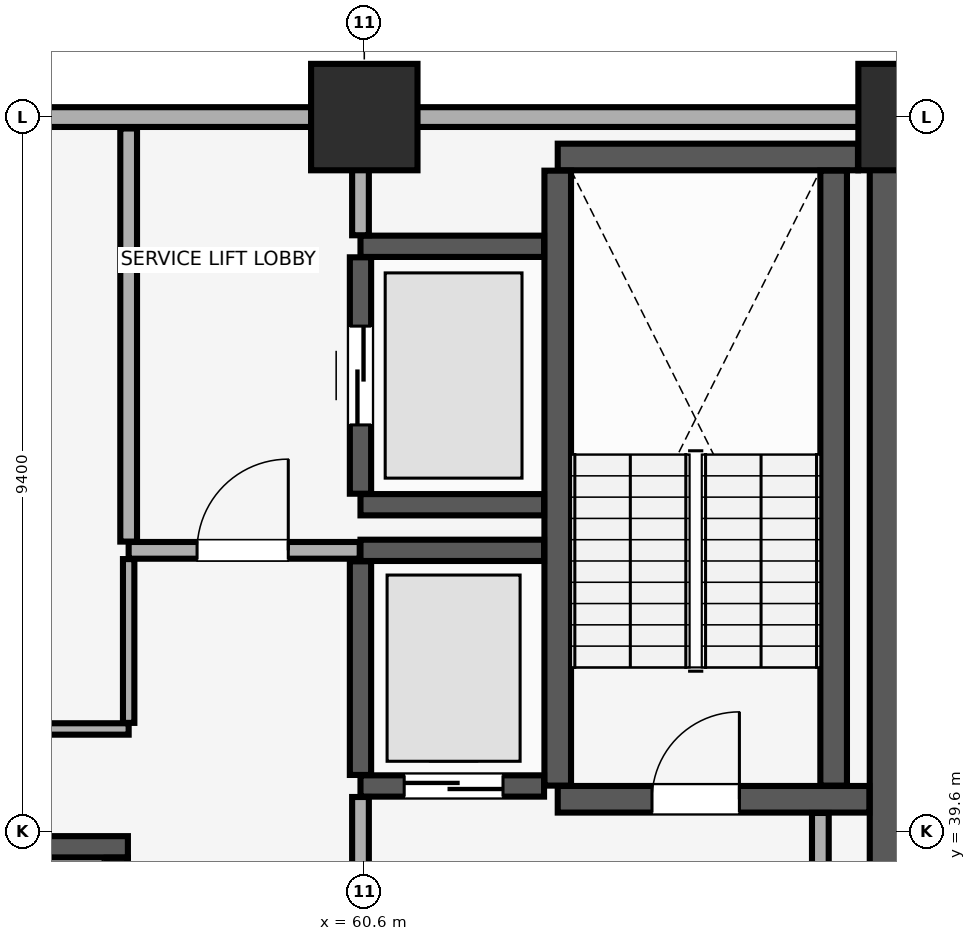
"""IFC4 building model, lengths in metres.
Left out: names, types, materials, properties, quantities, classifications, styles, units other than length and angle.
Written with IfcOpenShell. Run it as: python <this file> out.ifc"""

import sys

from ifc_helpers import new_model, si_unit, direction, frame, frame_2d, origin, origin_2d, place, context, subcontext, project, spatial, rectangle, extrude, element, fill, save


model = new_model("IFC4")
c1 = context("Model", 3, precision=1e-05, world=origin(), true_north=direction((0.0, 1.0)))
c2 = subcontext(c1, "Body", "Model", "MODEL_VIEW")
j1 = project(units=[si_unit("LENGTHUNIT", "METRE"), si_unit("PLANEANGLEUNIT", "RADIAN")], contexts=[c1])
p1 = place(None, origin())
s1 = spatial("IfcSite", under=j1, at=p1, CompositionType="ELEMENT")
p2 = place(p1, origin())
s2 = spatial("IfcBuilding", under=s1, at=p2, CompositionType="ELEMENT")
p3 = place(p2, frame((0.0, 0.0, 68.9)))
s3 = spatial("IfcBuildingStorey", under=s2, at=p3, CompositionType="ELEMENT", Elevation=68.9)
for number, where, z_axis, x_axis in (
    (1, (60.6, 49.0, 0.0), (0.0, 0.0, 1.0), (1.0, 0.0, 0.0)),
    (2, (67.8, 49.0, 0.0), (0.0, 0.0, 1.0), (1.0, 0.0, 0.0)),
):
    element("IfcColumn", number, at=place(p3, frame(where, z_axis=z_axis, x_axis=x_axis)), inside=s3, PredefinedType="COLUMN", context=c2, shape_type="SweptSolid", body=[
        extrude(rectangle(XDim=1.4, YDim=1.4, at=origin_2d()), origin(), (0.0, 0.0, 1.0), 3.51),
    ])
p4 = place(p3, frame((79.8, 49.0, 0.0), z_axis=(0.0, 0.0, 1.0), x_axis=(-1.0, 0.0, 0.0)))
e3 = element("IfcWall", 3, at=p4, inside=s3, PredefinedType="SOLIDWALL", context=c2, shape_type="SweptSolid", body=[
    extrude(rectangle(XDim=75.6, YDim=0.26, at=frame_2d((37.8, 0.0))), origin(), (0.0, 0.0, 1.0), 2.56),
])
p5 = place(p4, frame((72.565, 0.0, 0.85)))
e4 = element("IfcOpeningElement", 4, at=p5, cuts=e3, PredefinedType="OPENING", context=c2, shape_type="SweptSolid", body=[
    extrude(rectangle(XDim=1.5, YDim=1.4, at=frame_2d((0.75, 0.7))), frame((0.0, 0.14, 0.0), z_axis=(0.0, -1.0, 0.0), x_axis=(1.0, 0.0, 0.0)), (0.0, 0.0, 1.0), 0.28),
])
p6 = place(p4, frame((67.45, 0.0, 0.85)))
e5 = element("IfcOpeningElement", 5, at=p6, cuts=e3, PredefinedType="OPENING", context=c2, shape_type="SweptSolid", body=[
    extrude(rectangle(XDim=1.5, YDim=1.4, at=frame_2d((0.75, 0.7))), frame((0.0, 0.14, 0.0), z_axis=(0.0, -1.0, 0.0), x_axis=(1.0, 0.0, 0.0)), (0.0, 0.0, 1.0), 0.28),
])
p7 = place(p4, frame((6.65, 0.0, 0.85)))
e6 = element("IfcOpeningElement", 6, at=p7, cuts=e3, PredefinedType="OPENING", context=c2, shape_type="SweptSolid", body=[
    extrude(rectangle(XDim=1.5, YDim=1.4, at=frame_2d((0.75, 0.7))), frame((0.0, 0.14, 0.0), z_axis=(0.0, -1.0, 0.0), x_axis=(1.0, 0.0, 0.0)), (0.0, 0.0, 1.0), 0.28),
])
p8 = place(p4, frame((1.535, 0.0, 0.85)))
e7 = element("IfcOpeningElement", 7, at=p8, cuts=e3, PredefinedType="OPENING", context=c2, shape_type="SweptSolid", body=[
    extrude(rectangle(XDim=1.5, YDim=1.4, at=frame_2d((0.75, 0.7))), frame((0.0, 0.14, 0.0), z_axis=(0.0, -1.0, 0.0), x_axis=(1.0, 0.0, 0.0)), (0.0, 0.0, 1.0), 0.28),
])
p9 = place(p4, frame((51.365, 0.0, 0.9)))
e8 = element("IfcOpeningElement", 8, at=p9, cuts=e3, PredefinedType="OPENING", context=c2, shape_type="SweptSolid", body=[
    extrude(rectangle(XDim=1.5, YDim=1.4, at=frame_2d((0.75, 0.7))), frame((0.0, 0.14, 0.0), z_axis=(0.0, -1.0, 0.0), x_axis=(1.0, 0.0, 0.0)), (0.0, 0.0, 1.0), 0.28),
])
p10 = place(p4, frame((46.0, 0.0, 0.9)))
e9 = element("IfcOpeningElement", 9, at=p10, cuts=e3, PredefinedType="OPENING", context=c2, shape_type="SweptSolid", body=[
    extrude(rectangle(XDim=1.5, YDim=1.4, at=frame_2d((0.75, 0.7))), frame((0.0, 0.14, 0.0), z_axis=(0.0, -1.0, 0.0), x_axis=(1.0, 0.0, 0.0)), (0.0, 0.0, 1.0), 0.28),
])
p11 = place(p4, frame((29.15, 0.0, 0.9)))
e10 = element("IfcOpeningElement", 10, at=p11, cuts=e3, PredefinedType="OPENING", context=c2, shape_type="SweptSolid", body=[
    extrude(rectangle(XDim=1.5, YDim=1.4, at=frame_2d((0.75, 0.7))), frame((0.0, 0.14, 0.0), z_axis=(0.0, -1.0, 0.0), x_axis=(1.0, 0.0, 0.0)), (0.0, 0.0, 1.0), 0.28),
])
p12 = place(p4, frame((23.485, 0.0, 0.9)))
e11 = element("IfcOpeningElement", 11, at=p12, cuts=e3, PredefinedType="OPENING", context=c2, shape_type="SweptSolid", body=[
    extrude(rectangle(XDim=1.5, YDim=1.4, at=frame_2d((0.75, 0.7))), frame((0.0, 0.14, 0.0), z_axis=(0.0, -1.0, 0.0), x_axis=(1.0, 0.0, 0.0)), (0.0, 0.0, 1.0), 0.28),
])
p13 = place(p3, frame((67.8, 29.4, 0.0), z_axis=(0.0, 0.0, 1.0), x_axis=(0.0, 1.0, 0.0)))
e12 = element("IfcWall", 12, at=p13, inside=s3, PredefinedType="SHEAR", context=c2, shape_type="SweptSolid", body=[
    extrude(rectangle(XDim=19.2, YDim=1.1, at=frame_2d((9.6, 0.0))), origin(), (0.0, 0.0, 1.0), 3.51),
])
p14 = place(p3, frame((63.145, 40.025, 0.0), z_axis=(0.0, 0.0, 1.0), x_axis=(1.0, 0.0, 0.0)))
e13 = element("IfcWall", 13, at=p14, inside=s3, PredefinedType="SHEAR", context=c2, shape_type="SweptSolid", body=[
    extrude(rectangle(XDim=4.1, YDim=0.35, at=frame_2d((2.05, 0.0))), origin(), (0.0, 0.0, 1.0), 3.51),
])
p15 = place(p14, frame((1.24, 0.0, 0.0)))
e14 = element("IfcOpeningElement", 14, at=p15, cuts=e13, PredefinedType="OPENING", context=c2, shape_type="SweptSolid", body=[
    extrude(rectangle(XDim=1.15, YDim=2.15, at=frame_2d((0.575, 1.075))), frame((0.0, 0.185, 0.0), z_axis=(0.0, -1.0, 0.0), x_axis=(1.0, 0.0, 0.0)), (0.0, 0.0, 1.0), 0.37),
])
p16 = place(p3, frame((63.145, 48.475, 0.0), z_axis=(0.0, 0.0, 1.0), x_axis=(1.0, 0.0, 0.0)))
e15 = element("IfcWall", 15, at=p16, inside=s3, PredefinedType="SHEAR", context=c2, shape_type="SweptSolid", body=[
    extrude(rectangle(XDim=3.95, YDim=0.35, at=frame_2d((1.975, 0.0))), origin(), (0.0, 0.0, 1.0), 3.51),
])
for number, where, z_axis, x_axis in (
    (16, (63.145, 40.205, 0.0), (0.0, 0.0, 1.0), (0.0, 1.0, 0.0)),
    (17, (66.775, 40.205, 0.0), (0.0, 0.0, 1.0), (0.0, 1.0, 0.0)),
):
    element("IfcWall", number, at=place(p3, frame(where, z_axis=z_axis, x_axis=x_axis)), inside=s3, PredefinedType="SHEAR", context=c2, shape_type="SweptSolid", body=[
        extrude(rectangle(XDim=8.09, YDim=0.35, at=frame_2d((4.045, 0.0))), origin(), (0.0, 0.0, 1.0), 3.51),
    ])
p17 = place(p3, frame((54.66, 39.4, 0.0), z_axis=(0.0, 0.0, 1.0), x_axis=(1.0, 0.0, 0.0)))
e18 = element("IfcWall", 18, at=p17, inside=s3, PredefinedType="SHEAR", context=c2, shape_type="SweptSolid", body=[
    extrude(rectangle(XDim=2.83, YDim=0.28, at=frame_2d((1.415, 0.0))), origin(), (0.0, 0.0, 1.0), 3.51),
])
p18 = place(p3, frame((57.35, 37.145, 0.0), z_axis=(0.0, 0.0, 1.0), x_axis=(0.0, 1.0, 0.0)))
e19 = element("IfcWall", 19, at=p18, inside=s3, PredefinedType="SHEAR", context=c2, shape_type="SweptSolid", body=[
    extrude(rectangle(XDim=2.11, YDim=0.28, at=frame_2d((1.055, 0.0))), origin(), (0.0, 0.0, 1.0), 3.51),
])
p19 = place(p3, frame((60.55, 40.2, 0.0), z_axis=(0.0, 0.0, 1.0), x_axis=(1.0, 0.0, 0.0)))
e20 = element("IfcWall", 20, at=p19, inside=s3, PredefinedType="SHEAR", context=c2, shape_type="SweptSolid", body=[
    extrude(rectangle(XDim=2.415, YDim=0.28, at=frame_2d((1.208, 0.0))), origin(), (0.0, 0.0, 1.0), 3.51),
])
p20 = place(p19, frame((0.575, 0.0, 0.0)))
e21 = element("IfcOpeningElement", 21, at=p20, cuts=e20, PredefinedType="OPENING", context=c2, shape_type="SweptSolid", body=[
    extrude(rectangle(XDim=1.3, YDim=2.3, at=frame_2d((0.65, 1.15))), frame((0.0, 0.15, 0.0), z_axis=(0.0, -1.0, 0.0), x_axis=(1.0, 0.0, 0.0)), (0.0, 0.0, 1.0), 0.3),
])
p21 = place(p3, frame((60.55, 43.3, 0.0), z_axis=(0.0, 0.0, 1.0), x_axis=(1.0, 0.0, 0.0)))
e22 = element("IfcWall", 22, at=p21, inside=s3, PredefinedType="SHEAR", context=c2, shape_type="SweptSolid", body=[
    extrude(rectangle(XDim=2.415, YDim=0.28, at=frame_2d((1.208, 0.0))), origin(), (0.0, 0.0, 1.0), 3.51),
])
p22 = place(p3, frame((60.55, 40.345, 0.0), z_axis=(0.0, 0.0, 1.0), x_axis=(0.0, 1.0, 0.0)))
e23 = element("IfcWall", 23, at=p22, inside=s3, PredefinedType="SHEAR", context=c2, shape_type="SweptSolid", body=[
    extrude(rectangle(XDim=2.81, YDim=0.28, at=frame_2d((1.405, 0.0))), origin(), (0.0, 0.0, 1.0), 3.51),
])
for number, where, z_axis, x_axis in (
    (24, (60.55, 43.9, 0.0), (0.0, 0.0, 1.0), (1.0, 0.0, 0.0)),
    (25, (60.55, 47.3, 0.0), (0.0, 0.0, 1.0), (1.0, 0.0, 0.0)),
):
    element("IfcWall", number, at=place(p3, frame(where, z_axis=z_axis, x_axis=x_axis)), inside=s3, PredefinedType="SHEAR", context=c2, shape_type="SweptSolid", body=[
        extrude(rectangle(XDim=2.415, YDim=0.28, at=frame_2d((1.208, 0.0))), origin(), (0.0, 0.0, 1.0), 3.51),
    ])
p23 = place(p3, frame((60.55, 44.045, 0.0), z_axis=(0.0, 0.0, 1.0), x_axis=(0.0, 1.0, 0.0)))
e26 = element("IfcWall", 26, at=p23, inside=s3, PredefinedType="SHEAR", context=c2, shape_type="SweptSolid", body=[
    extrude(rectangle(XDim=3.11, YDim=0.28, at=frame_2d((1.555, 0.0))), origin(), (0.0, 0.0, 1.0), 3.51),
])
p24 = place(p23, frame((0.905, 0.0, 0.0)))
e27 = element("IfcOpeningElement", 27, at=p24, cuts=e26, PredefinedType="OPENING", context=c2, shape_type="SweptSolid", body=[
    extrude(rectangle(XDim=1.3, YDim=2.3, at=frame_2d((0.65, 1.15))), frame((0.0, 0.15, 0.0), z_axis=(0.0, -1.0, 0.0), x_axis=(1.0, 0.0, 0.0)), (0.0, 0.0, 1.0), 0.3),
])
p25 = place(p3, frame((60.55, 34.415, 0.0), z_axis=(0.0, 0.0, 1.0), x_axis=(0.0, 1.0, 0.0)))
e28 = element("IfcWall", 28, at=p25, inside=s3, PredefinedType="PARTITIONING", context=c2, shape_type="SweptSolid", body=[
    extrude(rectangle(XDim=5.64, YDim=0.22, at=frame_2d((2.82, 0.0))), origin(), (0.0, 0.0, 1.0), 3.51),
])
p26 = place(p3, frame((66.6, 34.415, 0.0), z_axis=(0.0, 0.0, 1.0), x_axis=(0.0, 1.0, 0.0)))
e29 = element("IfcWall", 29, at=p26, inside=s3, PredefinedType="PARTITIONING", context=c2, shape_type="SweptSolid", body=[
    extrude(rectangle(XDim=5.43, YDim=0.22, at=frame_2d((2.715, 0.0))), origin(), (0.0, 0.0, 1.0), 3.51),
])
p27 = place(p3, frame((57.5, 43.3, 0.0), z_axis=(0.0, 0.0, 1.0), x_axis=(1.0, 0.0, 0.0)))
e30 = element("IfcWall", 30, at=p27, inside=s3, PredefinedType="PARTITIONING", context=c2, shape_type="SweptSolid", body=[
    extrude(rectangle(XDim=3.04, YDim=0.22, at=frame_2d((1.52, 0.0))), origin(), (0.0, 0.0, 1.0), 3.51),
])
p28 = place(p27, frame((0.9, 0.0, 0.0)))
e31 = element("IfcOpeningElement", 31, at=p28, cuts=e30, PredefinedType="OPENING", context=c2, shape_type="SweptSolid", body=[
    extrude(rectangle(XDim=1.2, YDim=2.15, at=frame_2d((0.6, 1.075))), frame((0.0, 0.12, 0.0), z_axis=(0.0, -1.0, 0.0), x_axis=(1.0, 0.0, 0.0)), (0.0, 0.0, 1.0), 0.24),
])
p29 = place(p3, frame((57.5, 43.415, 0.0), z_axis=(0.0, 0.0, 1.0), x_axis=(0.0, 1.0, 0.0)))
e32 = element("IfcWall", 32, at=p29, inside=s3, PredefinedType="PARTITIONING", context=c2, shape_type="SweptSolid", body=[
    extrude(rectangle(XDim=5.435, YDim=0.22, at=frame_2d((2.718, 0.0))), origin(), (0.0, 0.0, 1.0), 3.51),
])
p30 = place(p3, frame((60.55, 47.445, 0.0), z_axis=(0.0, 0.0, 1.0), x_axis=(0.0, 1.0, 0.0)))
e33 = element("IfcWall", 33, at=p30, inside=s3, PredefinedType="PARTITIONING", context=c2, shape_type="SweptSolid", body=[
    extrude(rectangle(XDim=1.405, YDim=0.22, at=frame_2d((0.703, 0.0))), origin(), (0.0, 0.0, 1.0), 3.51),
])
p31 = place(p3, frame((52.48, 40.95, 0.0), z_axis=(0.0, 0.0, 1.0), x_axis=(1.0, 0.0, 0.0)))
e34 = element("IfcWall", 34, at=p31, inside=s3, PredefinedType="PARTITIONING", context=c2, shape_type="SweptSolid", body=[
    extrude(rectangle(XDim=5.02, YDim=0.15, at=frame_2d((2.51, 0.0))), origin(), (0.0, 0.0, 1.0), 3.51),
])
p32 = place(p31, frame((2.045, 0.0, 0.0)))
e35 = element("IfcOpeningElement", 35, at=p32, cuts=e34, PredefinedType="OPENING", context=c2, shape_type="SweptSolid", body=[
    extrude(rectangle(XDim=0.85, YDim=2.1, at=frame_2d((0.425, 1.05))), frame((0.0, 0.085, 0.0), z_axis=(0.0, -1.0, 0.0), x_axis=(1.0, 0.0, 0.0)), (0.0, 0.0, 1.0), 0.17),
])
p33 = place(p3, frame((57.5, 41.03, 0.0), z_axis=(0.0, 0.0, 1.0), x_axis=(0.0, 1.0, 0.0)))
e36 = element("IfcWall", 36, at=p33, inside=s3, PredefinedType="PARTITIONING", context=c2, shape_type="SweptSolid", body=[
    extrude(rectangle(XDim=2.155, YDim=0.15, at=frame_2d((1.078, 0.0))), origin(), (0.0, 0.0, 1.0), 3.51),
])
p34 = place(p15, origin())
e37 = element("IfcDoor", 37, at=p34, inside=s3, OperationType="SINGLE_SWING_RIGHT", PredefinedType="DOOR", context=c2, shape_type="SweptSolid", body=[
    extrude(rectangle(XDim=1.15, YDim=2.15, at=frame_2d((0.575, 1.075))), frame((0.0, 0.025, 0.0), z_axis=(0.0, -1.0, 0.0), x_axis=(1.0, 0.0, 0.0)), (0.0, 0.0, 1.0), 0.05),
])
fill(e14, e37)
p35 = place(p20, origin())
e38 = element("IfcDoor", 38, at=p35, inside=s3, OperationType="DOUBLE_DOOR_SLIDING", PredefinedType="DOOR", context=c2, shape_type="SweptSolid", body=[
    extrude(rectangle(XDim=1.3, YDim=2.3, at=frame_2d((0.65, 1.15))), frame((0.0, 0.025, 0.0), z_axis=(0.0, -1.0, 0.0), x_axis=(1.0, 0.0, 0.0)), (0.0, 0.0, 1.0), 0.05),
])
fill(e21, e38)
p36 = place(p24, origin())
e39 = element("IfcDoor", 39, at=p36, inside=s3, OperationType="DOUBLE_DOOR_SLIDING", PredefinedType="DOOR", context=c2, shape_type="SweptSolid", body=[
    extrude(rectangle(XDim=1.3, YDim=2.3, at=frame_2d((0.65, 1.15))), frame((0.0, 0.025, 0.0), z_axis=(0.0, -1.0, 0.0), x_axis=(1.0, 0.0, 0.0)), (0.0, 0.0, 1.0), 0.05),
])
fill(e27, e39)
p37 = place(p28, origin())
e40 = element("IfcDoor", 40, at=p37, inside=s3, OperationType="SINGLE_SWING_RIGHT", PredefinedType="DOOR", context=c2, shape_type="SweptSolid", body=[
    extrude(rectangle(XDim=1.2, YDim=2.15, at=frame_2d((0.6, 1.075))), frame((0.0, 0.025, 0.0), z_axis=(0.0, -1.0, 0.0), x_axis=(1.0, 0.0, 0.0)), (0.0, 0.0, 1.0), 0.05),
])
fill(e31, e40)
save(model, sys.argv[1])
